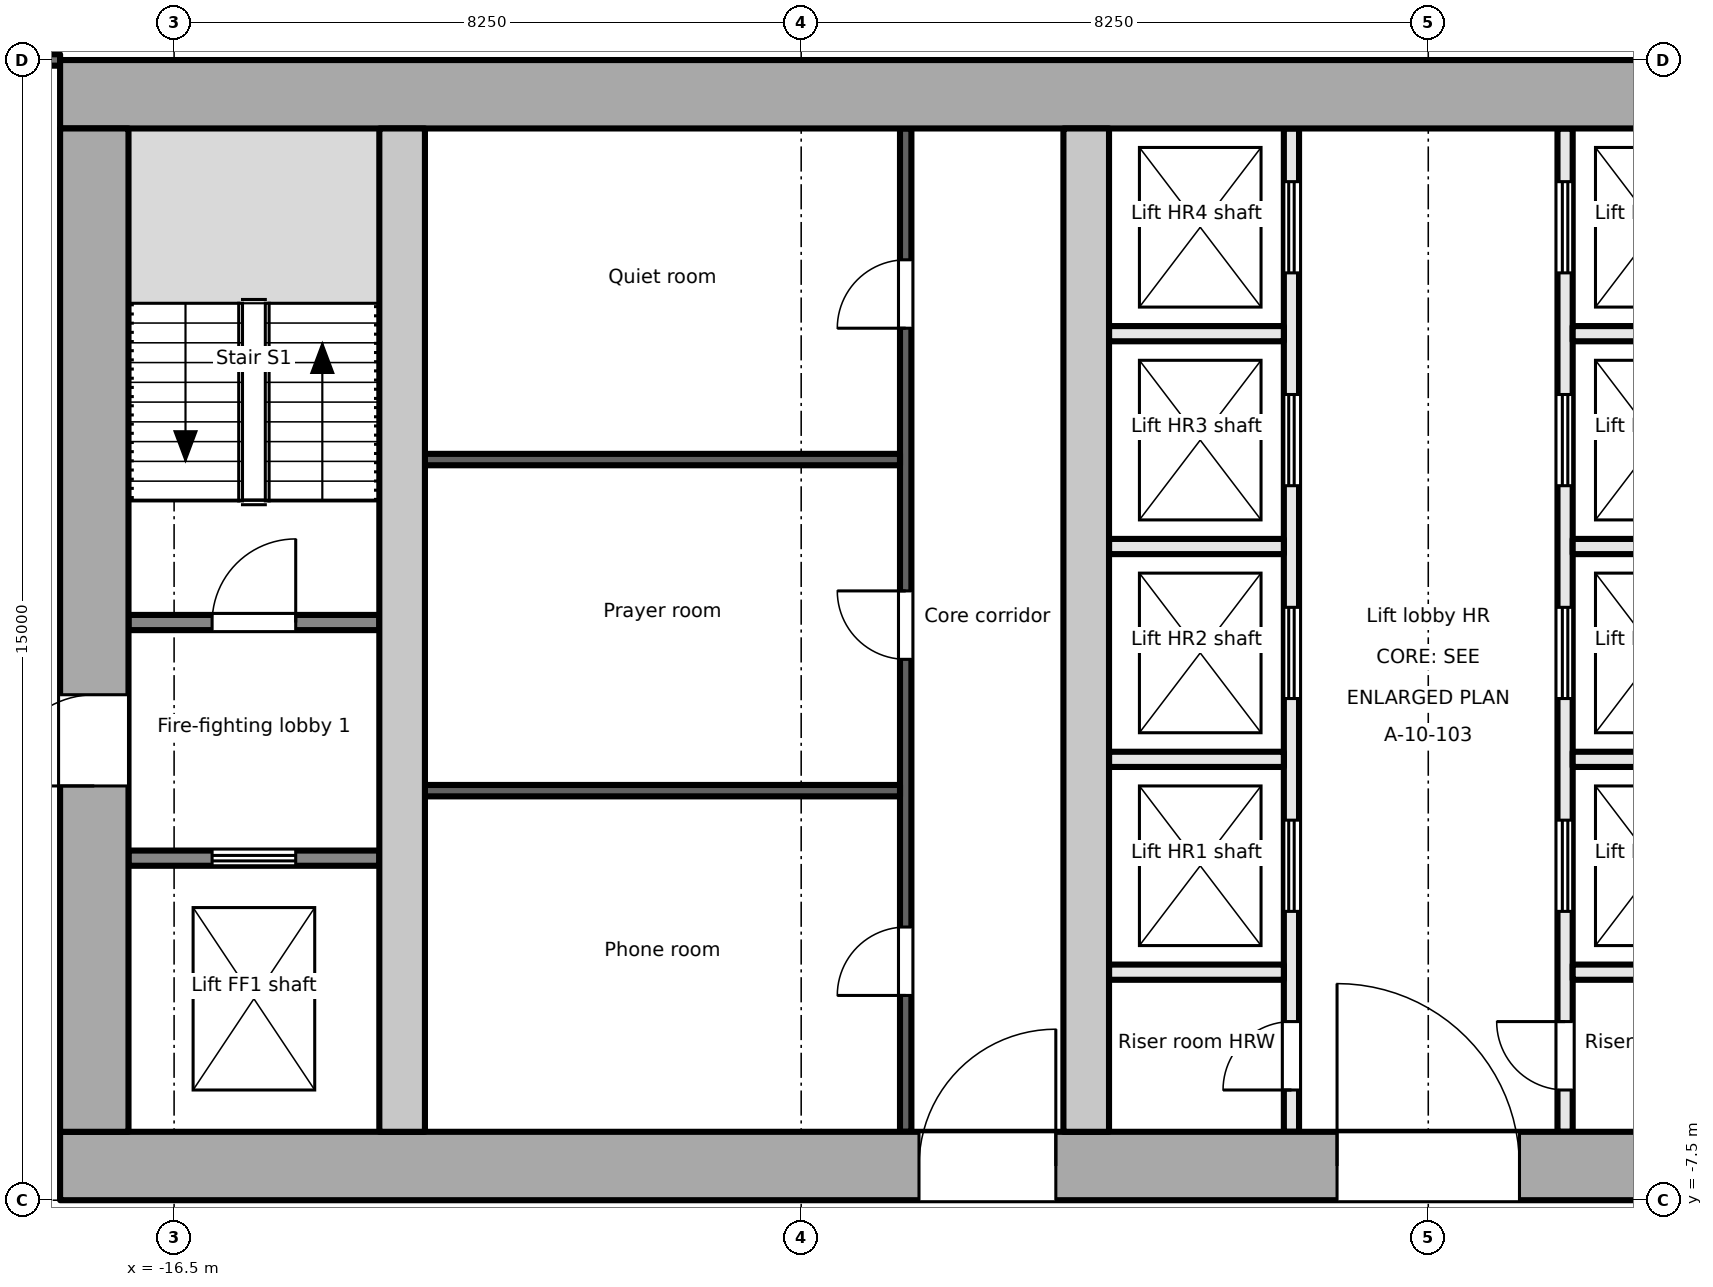
"""IFC4 building model, lengths in metres.
Left out: names, types, materials, properties, quantities, classifications, styles, units other than length and angle.
Written with IfcOpenShell. Run it as: python <this file> out.ifc"""

import sys

from ifc_helpers import new_model, si_unit, direction, frame, frame_2d, origin, place, context, subcontext, project, spatial, rectangle, extrude, element, fill, save


model = new_model("IFC4")
c1 = context("Model", 3, precision=1e-05, world=origin(), true_north=direction((0.0, 1.0)))
c2 = subcontext(c1, "Body", "Model", "MODEL_VIEW")
j1 = project(units=[si_unit("LENGTHUNIT", "METRE"), si_unit("PLANEANGLEUNIT", "RADIAN")], contexts=[c1])
p1 = place(None, origin())
s1 = spatial("IfcSite", under=j1, at=p1, CompositionType="ELEMENT")
p2 = place(p1, origin())
s2 = spatial("IfcBuilding", under=s1, at=p2, CompositionType="ELEMENT")
p3 = place(p2, frame((0.0, 0.0, 180.2)))
s3 = spatial("IfcBuildingStorey", under=s2, at=p3, CompositionType="ELEMENT", Elevation=180.2)
p4 = place(p3, frame((-18.0, -7.05, -0.2), z_axis=(0.0, 0.0, 1.0), x_axis=(1.0, 0.0, 0.0)))
e1 = element("IfcWall", 1, at=p4, inside=s3, PredefinedType="SHEAR", context=c2, shape_type="SweptSolid", body=[
    extrude(rectangle(XDim=36.0, YDim=0.9, at=frame_2d((18.0, 0.0))), origin(), (0.0, 0.0, 1.0), 3.9),
])
p5 = place(p4, frame((11.3, 0.0, 0.2)))
e2 = element("IfcOpeningElement", 2, at=p5, cuts=e1, PredefinedType="OPENING", context=c2, shape_type="SweptSolid", body=[
    extrude(rectangle(XDim=1.8, YDim=2.1, at=frame_2d((0.9, 1.05))), frame((0.0, 0.46, 0.0), z_axis=(0.0, -1.0, 0.0), x_axis=(1.0, 0.0, 0.0)), (0.0, 0.0, 1.0), 0.921),
])
p6 = place(p4, frame((16.8, 0.0, 0.2)))
e3 = element("IfcOpeningElement", 3, at=p6, cuts=e1, PredefinedType="OPENING", context=c2, shape_type="SweptSolid", body=[
    extrude(rectangle(XDim=2.4, YDim=2.1, at=frame_2d((1.2, 1.05))), frame((0.0, 0.46, 0.0), z_axis=(0.0, -1.0, 0.0), x_axis=(1.0, 0.0, 0.0)), (0.0, 0.0, 1.0), 0.921),
])
p7 = place(p4, frame((26.1, 0.0, 0.2)))
e4 = element("IfcOpeningElement", 4, at=p7, cuts=e1, PredefinedType="OPENING", context=c2, shape_type="SweptSolid", body=[
    extrude(rectangle(XDim=2.4, YDim=2.1, at=frame_2d((1.2, 1.05))), frame((0.0, 0.46, 0.0), z_axis=(0.0, -1.0, 0.0), x_axis=(1.0, 0.0, 0.0)), (0.0, 0.0, 1.0), 0.921),
])
p8 = place(p3, frame((-18.0, 7.05, -0.2), z_axis=(0.0, 0.0, 1.0), x_axis=(1.0, 0.0, 0.0)))
e5 = element("IfcWall", 5, at=p8, inside=s3, PredefinedType="SHEAR", context=c2, shape_type="SweptSolid", body=[
    extrude(rectangle(XDim=36.0, YDim=0.9, at=frame_2d((18.0, 0.0))), origin(), (0.0, 0.0, 1.0), 3.9),
])
p9 = place(p3, frame((-17.55, -6.6, -0.2), z_axis=(0.0, 0.0, 1.0), x_axis=(0.0, 1.0, 0.0)))
e6 = element("IfcWall", 6, at=p9, inside=s3, PredefinedType="SHEAR", context=c2, shape_type="SweptSolid", body=[
    extrude(rectangle(XDim=13.2, YDim=0.9, at=frame_2d((6.6, 0.0))), origin(), (0.0, 0.0, 1.0), 3.9),
])
p10 = place(p9, frame((4.55, 0.0, 0.2)))
e7 = element("IfcOpeningElement", 7, at=p10, cuts=e6, PredefinedType="OPENING", context=c2, shape_type="SweptSolid", body=[
    extrude(rectangle(XDim=1.2, YDim=2.1, at=frame_2d((0.6, 1.05))), frame((0.0, 0.46, 0.0), z_axis=(0.0, -1.0, 0.0), x_axis=(1.0, 0.0, 0.0)), (0.0, 0.0, 1.0), 0.921),
])
for number, where, z_axis, x_axis in (
    (8, (-13.5, -6.6, -0.2), (0.0, 0.0, 1.0), (0.0, 1.0, 0.0)),
    (9, (-4.5, -6.6, -0.2), (0.0, 0.0, 1.0), (0.0, 1.0, 0.0)),
):
    element("IfcWall", number, at=place(p3, frame(where, z_axis=z_axis, x_axis=x_axis)), inside=s3, PredefinedType="SHEAR", context=c2, shape_type="SweptSolid", body=[
        extrude(rectangle(XDim=13.2, YDim=0.6, at=frame_2d((6.6, 0.0))), origin(), (0.0, 0.0, 1.0), 3.9),
    ])
p11 = place(p3, frame((-17.1, -3.0, 0.0), z_axis=(0.0, 0.0, 1.0), x_axis=(1.0, 0.0, 0.0)))
e10 = element("IfcWall", 10, at=p11, inside=s3, PredefinedType="PARTITIONING", context=c2, shape_type="SweptSolid", body=[
    extrude(rectangle(XDim=3.3, YDim=0.2, at=frame_2d((1.65, 0.0))), origin(), (0.0, 0.0, 1.0), 3.7),
])
p12 = place(p11, frame((1.1, 0.0, 0.0)))
e11 = element("IfcOpeningElement", 11, at=p12, cuts=e10, PredefinedType="OPENING", context=c2, shape_type="SweptSolid", body=[
    extrude(rectangle(XDim=1.1, YDim=2.1, at=frame_2d((0.55, 1.05))), frame((0.0, 0.111, 0.0), z_axis=(0.0, -1.0, 0.0), x_axis=(1.0, 0.0, 0.0)), (0.0, 0.0, 1.0), 0.221),
])
p13 = place(p3, frame((-17.1, 0.1, 0.0), z_axis=(0.0, 0.0, 1.0), x_axis=(1.0, 0.0, 0.0)))
e12 = element("IfcWall", 12, at=p13, inside=s3, PredefinedType="PARTITIONING", context=c2, shape_type="SweptSolid", body=[
    extrude(rectangle(XDim=3.3, YDim=0.2, at=frame_2d((1.65, 0.0))), origin(), (0.0, 0.0, 1.0), 3.7),
])
p14 = place(p13, frame((1.1, 0.0, 0.0)))
e13 = element("IfcOpeningElement", 13, at=p14, cuts=e12, PredefinedType="OPENING", context=c2, shape_type="SweptSolid", body=[
    extrude(rectangle(XDim=1.1, YDim=2.1, at=frame_2d((0.55, 1.05))), frame((0.0, 0.111, 0.0), z_axis=(0.0, -1.0, 0.0), x_axis=(1.0, 0.0, 0.0)), (0.0, 0.0, 1.0), 0.221),
])
p15 = place(p3, frame((-6.875, -6.6, 0.0), z_axis=(0.0, 0.0, 1.0), x_axis=(0.0, 1.0, 0.0)))
e14 = element("IfcWall", 14, at=p15, inside=s3, PredefinedType="PARTITIONING", context=c2, shape_type="SweptSolid", body=[
    extrude(rectangle(XDim=13.2, YDim=0.15, at=frame_2d((6.6, 0.0))), origin(), (0.0, 0.0, 1.0), 3.7),
])
p16 = place(p15, frame((1.794, 0.0, 0.0)))
e15 = element("IfcOpeningElement", 15, at=p16, cuts=e14, PredefinedType="OPENING", context=c2, shape_type="SweptSolid", body=[
    extrude(rectangle(XDim=0.9, YDim=2.1, at=frame_2d((0.45, 1.05))), frame((0.0, 0.085, 0.0), z_axis=(0.0, -1.0, 0.0), x_axis=(1.0, 0.0, 0.0)), (0.0, 0.0, 1.0), 0.171),
])
p17 = place(p15, frame((6.216, 0.0, 0.0)))
e16 = element("IfcOpeningElement", 16, at=p17, cuts=e14, PredefinedType="OPENING", context=c2, shape_type="SweptSolid", body=[
    extrude(rectangle(XDim=0.9, YDim=2.1, at=frame_2d((0.45, 1.05))), frame((0.0, 0.085, 0.0), z_axis=(0.0, -1.0, 0.0), x_axis=(1.0, 0.0, 0.0)), (0.0, 0.0, 1.0), 0.171),
])
p18 = place(p15, frame((10.572, 0.0, 0.0)))
e17 = element("IfcOpeningElement", 17, at=p18, cuts=e14, PredefinedType="OPENING", context=c2, shape_type="SweptSolid", body=[
    extrude(rectangle(XDim=0.9, YDim=2.1, at=frame_2d((0.45, 1.05))), frame((0.0, 0.085, 0.0), z_axis=(0.0, -1.0, 0.0), x_axis=(1.0, 0.0, 0.0)), (0.0, 0.0, 1.0), 0.171),
])
for number, where, z_axis, x_axis in (
    (18, (-13.2, -2.112, 0.0), (0.0, 0.0, 1.0), (1.0, 0.0, 0.0)),
    (19, (-13.2, 2.244, 0.0), (0.0, 0.0, 1.0), (1.0, 0.0, 0.0)),
):
    element("IfcWall", number, at=place(p3, frame(where, z_axis=z_axis, x_axis=x_axis)), inside=s3, PredefinedType="PARTITIONING", context=c2, shape_type="SweptSolid", body=[
        extrude(rectangle(XDim=6.25, YDim=0.15, at=frame_2d((3.125, 0.0))), origin(), (0.0, 0.0, 1.0), 3.7),
    ])
p19 = place(p3, frame((-1.8, -6.6, 0.0), z_axis=(0.0, 0.0, 1.0), x_axis=(0.0, 1.0, 0.0)))
e20 = element("IfcWall", 20, at=p19, inside=s3, PredefinedType="PARTITIONING", context=c2, shape_type="SweptSolid", body=[
    extrude(rectangle(XDim=13.2, YDim=0.2, at=frame_2d((6.6, 0.0))), origin(), (0.0, 0.0, 1.0), 3.7),
])
p20 = place(p19, frame((0.55, 0.0, 0.0)))
e21 = element("IfcOpeningElement", 21, at=p20, cuts=e20, PredefinedType="OPENING", context=c2, shape_type="SweptSolid", body=[
    extrude(rectangle(XDim=0.9, YDim=2.1, at=frame_2d((0.45, 1.05))), frame((0.0, 0.111, 0.0), z_axis=(0.0, -1.0, 0.0), x_axis=(1.0, 0.0, 0.0)), (0.0, 0.0, 1.0), 0.221),
])
p21 = place(p19, frame((2.9, 0.0, 0.0)))
e22 = element("IfcOpeningElement", 22, at=p21, cuts=e20, PredefinedType="OPENING", context=c2, shape_type="SweptSolid", body=[
    extrude(rectangle(XDim=1.2, YDim=2.1, at=frame_2d((0.6, 1.05))), frame((0.0, 0.111, 0.0), z_axis=(0.0, -1.0, 0.0), x_axis=(1.0, 0.0, 0.0)), (0.0, 0.0, 1.0), 0.221),
])
p22 = place(p19, frame((5.7, 0.0, 0.0)))
e23 = element("IfcOpeningElement", 23, at=p22, cuts=e20, PredefinedType="OPENING", context=c2, shape_type="SweptSolid", body=[
    extrude(rectangle(XDim=1.2, YDim=2.1, at=frame_2d((0.6, 1.05))), frame((0.0, 0.111, 0.0), z_axis=(0.0, -1.0, 0.0), x_axis=(1.0, 0.0, 0.0)), (0.0, 0.0, 1.0), 0.221),
])
p23 = place(p19, frame((8.5, 0.0, 0.0)))
e24 = element("IfcOpeningElement", 24, at=p23, cuts=e20, PredefinedType="OPENING", context=c2, shape_type="SweptSolid", body=[
    extrude(rectangle(XDim=1.2, YDim=2.1, at=frame_2d((0.6, 1.05))), frame((0.0, 0.111, 0.0), z_axis=(0.0, -1.0, 0.0), x_axis=(1.0, 0.0, 0.0)), (0.0, 0.0, 1.0), 0.221),
])
p24 = place(p19, frame((11.3, 0.0, 0.0)))
e25 = element("IfcOpeningElement", 25, at=p24, cuts=e20, PredefinedType="OPENING", context=c2, shape_type="SweptSolid", body=[
    extrude(rectangle(XDim=1.2, YDim=2.1, at=frame_2d((0.6, 1.05))), frame((0.0, 0.111, 0.0), z_axis=(0.0, -1.0, 0.0), x_axis=(1.0, 0.0, 0.0)), (0.0, 0.0, 1.0), 0.221),
])
p25 = place(p3, frame((1.8, -6.6, 0.0), z_axis=(0.0, 0.0, 1.0), x_axis=(0.0, 1.0, 0.0)))
e26 = element("IfcWall", 26, at=p25, inside=s3, PredefinedType="PARTITIONING", context=c2, shape_type="SweptSolid", body=[
    extrude(rectangle(XDim=13.2, YDim=0.2, at=frame_2d((6.6, 0.0))), origin(), (0.0, 0.0, 1.0), 3.7),
])
p26 = place(p25, frame((0.55, 0.0, 0.0)))
e27 = element("IfcOpeningElement", 27, at=p26, cuts=e26, PredefinedType="OPENING", context=c2, shape_type="SweptSolid", body=[
    extrude(rectangle(XDim=0.9, YDim=2.1, at=frame_2d((0.45, 1.05))), frame((0.0, 0.111, 0.0), z_axis=(0.0, -1.0, 0.0), x_axis=(1.0, 0.0, 0.0)), (0.0, 0.0, 1.0), 0.221),
])
p27 = place(p25, frame((2.9, 0.0, 0.0)))
e28 = element("IfcOpeningElement", 28, at=p27, cuts=e26, PredefinedType="OPENING", context=c2, shape_type="SweptSolid", body=[
    extrude(rectangle(XDim=1.2, YDim=2.1, at=frame_2d((0.6, 1.05))), frame((0.0, 0.111, 0.0), z_axis=(0.0, -1.0, 0.0), x_axis=(1.0, 0.0, 0.0)), (0.0, 0.0, 1.0), 0.221),
])
p28 = place(p25, frame((5.7, 0.0, 0.0)))
e29 = element("IfcOpeningElement", 29, at=p28, cuts=e26, PredefinedType="OPENING", context=c2, shape_type="SweptSolid", body=[
    extrude(rectangle(XDim=1.2, YDim=2.1, at=frame_2d((0.6, 1.05))), frame((0.0, 0.111, 0.0), z_axis=(0.0, -1.0, 0.0), x_axis=(1.0, 0.0, 0.0)), (0.0, 0.0, 1.0), 0.221),
])
p29 = place(p25, frame((8.5, 0.0, 0.0)))
e30 = element("IfcOpeningElement", 30, at=p29, cuts=e26, PredefinedType="OPENING", context=c2, shape_type="SweptSolid", body=[
    extrude(rectangle(XDim=1.2, YDim=2.1, at=frame_2d((0.6, 1.05))), frame((0.0, 0.111, 0.0), z_axis=(0.0, -1.0, 0.0), x_axis=(1.0, 0.0, 0.0)), (0.0, 0.0, 1.0), 0.221),
])
p30 = place(p25, frame((11.3, 0.0, 0.0)))
e31 = element("IfcOpeningElement", 31, at=p30, cuts=e26, PredefinedType="OPENING", context=c2, shape_type="SweptSolid", body=[
    extrude(rectangle(XDim=1.2, YDim=2.1, at=frame_2d((0.6, 1.05))), frame((0.0, 0.111, 0.0), z_axis=(0.0, -1.0, 0.0), x_axis=(1.0, 0.0, 0.0)), (0.0, 0.0, 1.0), 0.221),
])
for number, where, z_axis, x_axis in (
    (32, (-4.2, -1.7, 0.0), (0.0, 0.0, 1.0), (1.0, 0.0, 0.0)),
    (33, (-4.2, 1.1, 0.0), (0.0, 0.0, 1.0), (1.0, 0.0, 0.0)),
    (34, (-4.2, 3.9, 0.0), (0.0, 0.0, 1.0), (1.0, 0.0, 0.0)),
    (35, (-4.2, -4.5, 0.0), (0.0, 0.0, 1.0), (1.0, 0.0, 0.0)),
    (36, (1.9, -1.7, 0.0), (0.0, 0.0, 1.0), (1.0, 0.0, 0.0)),
    (37, (1.9, 1.1, 0.0), (0.0, 0.0, 1.0), (1.0, 0.0, 0.0)),
    (38, (1.9, 3.9, 0.0), (0.0, 0.0, 1.0), (1.0, 0.0, 0.0)),
    (39, (1.9, -4.5, 0.0), (0.0, 0.0, 1.0), (1.0, 0.0, 0.0)),
):
    element("IfcWall", number, at=place(p3, frame(where, z_axis=z_axis, x_axis=x_axis)), inside=s3, PredefinedType="PARTITIONING", context=c2, shape_type="SweptSolid", body=[
        extrude(rectangle(XDim=2.3, YDim=0.2, at=frame_2d((1.15, 0.0))), origin(), (0.0, 0.0, 1.0), 3.7),
    ])
p31 = place(p3, frame((-20.625, 7.501, 0.0), z_axis=(0.0, 0.0, 1.0), x_axis=(1.0, 0.0, 0.0)))
e40 = element("IfcWall", 40, at=p31, inside=s3, PredefinedType="PARTITIONING", context=c2, shape_type="SweptSolid", body=[
    extrude(rectangle(XDim=2.625, YDim=0.15, at=frame_2d((1.312, 0.0))), origin(), (0.0, 0.0, 1.0), 3.7),
])
p32 = place(p12, origin())
e41 = element("IfcDoor", 41, at=p32, inside=s3, OperationType="DOUBLE_DOOR_SLIDING", PredefinedType="DOOR", context=c2, shape_type="SweptSolid", body=[
    extrude(rectangle(XDim=1.1, YDim=2.1, at=frame_2d((0.55, 1.05))), frame((0.0, 0.025, 0.0), z_axis=(0.0, -1.0, 0.0), x_axis=(1.0, 0.0, 0.0)), (0.0, 0.0, 1.0), 0.05),
])
fill(e11, e41)
p33 = place(p10, origin())
e42 = element("IfcDoor", 42, at=p33, inside=s3, OperationType="SINGLE_SWING_LEFT", PredefinedType="DOOR", context=c2, shape_type="SweptSolid", body=[
    extrude(rectangle(XDim=1.2, YDim=2.1, at=frame_2d((0.6, 1.05))), frame((0.0, 0.025, 0.0), z_axis=(0.0, -1.0, 0.0), x_axis=(1.0, 0.0, 0.0)), (0.0, 0.0, 1.0), 0.05),
])
fill(e7, e42)
p34 = place(p14, origin())
e43 = element("IfcDoor", 43, at=p34, inside=s3, OperationType="SINGLE_SWING_RIGHT", PredefinedType="DOOR", context=c2, shape_type="SweptSolid", body=[
    extrude(rectangle(XDim=1.1, YDim=2.1, at=frame_2d((0.55, 1.05))), frame((0.0, 0.025, 0.0), z_axis=(0.0, -1.0, 0.0), x_axis=(1.0, 0.0, 0.0)), (0.0, 0.0, 1.0), 0.05),
])
fill(e13, e43)
p35 = place(p16, origin())
e44 = element("IfcDoor", 44, at=p35, inside=s3, OperationType="SINGLE_SWING_LEFT", PredefinedType="DOOR", context=c2, shape_type="SweptSolid", body=[
    extrude(rectangle(XDim=0.9, YDim=2.1, at=frame_2d((0.45, 1.05))), frame((0.0, 0.025, 0.0), z_axis=(0.0, -1.0, 0.0), x_axis=(1.0, 0.0, 0.0)), (0.0, 0.0, 1.0), 0.05),
])
fill(e15, e44)
p36 = place(p17, origin())
e45 = element("IfcDoor", 45, at=p36, inside=s3, OperationType="SINGLE_SWING_RIGHT", PredefinedType="DOOR", context=c2, shape_type="SweptSolid", body=[
    extrude(rectangle(XDim=0.9, YDim=2.1, at=frame_2d((0.45, 1.05))), frame((0.0, 0.025, 0.0), z_axis=(0.0, -1.0, 0.0), x_axis=(1.0, 0.0, 0.0)), (0.0, 0.0, 1.0), 0.05),
])
fill(e16, e45)
p37 = place(p18, origin())
e46 = element("IfcDoor", 46, at=p37, inside=s3, OperationType="SINGLE_SWING_LEFT", PredefinedType="DOOR", context=c2, shape_type="SweptSolid", body=[
    extrude(rectangle(XDim=0.9, YDim=2.1, at=frame_2d((0.45, 1.05))), frame((0.0, 0.025, 0.0), z_axis=(0.0, -1.0, 0.0), x_axis=(1.0, 0.0, 0.0)), (0.0, 0.0, 1.0), 0.05),
])
fill(e17, e46)
p38 = place(p5, origin())
e47 = element("IfcDoor", 47, at=p38, inside=s3, OperationType="SINGLE_SWING_RIGHT", PredefinedType="DOOR", context=c2, shape_type="SweptSolid", body=[
    extrude(rectangle(XDim=1.8, YDim=2.1, at=frame_2d((0.9, 1.05))), frame((0.0, 0.025, 0.0), z_axis=(0.0, -1.0, 0.0), x_axis=(1.0, 0.0, 0.0)), (0.0, 0.0, 1.0), 0.05),
])
fill(e2, e47)
p39 = place(p20, origin())
e48 = element("IfcDoor", 48, at=p39, inside=s3, OperationType="SINGLE_SWING_LEFT", PredefinedType="DOOR", context=c2, shape_type="SweptSolid", body=[
    extrude(rectangle(XDim=0.9, YDim=2.1, at=frame_2d((0.45, 1.05))), frame((0.0, 0.025, 0.0), z_axis=(0.0, -1.0, 0.0), x_axis=(1.0, 0.0, 0.0)), (0.0, 0.0, 1.0), 0.05),
])
fill(e21, e48)
p40 = place(p21, origin())
e49 = element("IfcDoor", 49, at=p40, inside=s3, OperationType="DOUBLE_DOOR_SLIDING", PredefinedType="DOOR", context=c2, shape_type="SweptSolid", body=[
    extrude(rectangle(XDim=1.2, YDim=2.1, at=frame_2d((0.6, 1.05))), frame((0.0, 0.025, 0.0), z_axis=(0.0, -1.0, 0.0), x_axis=(1.0, 0.0, 0.0)), (0.0, 0.0, 1.0), 0.05),
])
fill(e22, e49)
p41 = place(p22, origin())
e50 = element("IfcDoor", 50, at=p41, inside=s3, OperationType="DOUBLE_DOOR_SLIDING", PredefinedType="DOOR", context=c2, shape_type="SweptSolid", body=[
    extrude(rectangle(XDim=1.2, YDim=2.1, at=frame_2d((0.6, 1.05))), frame((0.0, 0.025, 0.0), z_axis=(0.0, -1.0, 0.0), x_axis=(1.0, 0.0, 0.0)), (0.0, 0.0, 1.0), 0.05),
])
fill(e23, e50)
p42 = place(p23, origin())
e51 = element("IfcDoor", 51, at=p42, inside=s3, OperationType="DOUBLE_DOOR_SLIDING", PredefinedType="DOOR", context=c2, shape_type="SweptSolid", body=[
    extrude(rectangle(XDim=1.2, YDim=2.1, at=frame_2d((0.6, 1.05))), frame((0.0, 0.025, 0.0), z_axis=(0.0, -1.0, 0.0), x_axis=(1.0, 0.0, 0.0)), (0.0, 0.0, 1.0), 0.05),
])
fill(e24, e51)
p43 = place(p24, origin())
e52 = element("IfcDoor", 52, at=p43, inside=s3, OperationType="DOUBLE_DOOR_SLIDING", PredefinedType="DOOR", context=c2, shape_type="SweptSolid", body=[
    extrude(rectangle(XDim=1.2, YDim=2.1, at=frame_2d((0.6, 1.05))), frame((0.0, 0.025, 0.0), z_axis=(0.0, -1.0, 0.0), x_axis=(1.0, 0.0, 0.0)), (0.0, 0.0, 1.0), 0.05),
])
fill(e25, e52)
p44 = place(p26, origin())
e53 = element("IfcDoor", 53, at=p44, inside=s3, OperationType="SINGLE_SWING_RIGHT", PredefinedType="DOOR", context=c2, shape_type="SweptSolid", body=[
    extrude(rectangle(XDim=0.9, YDim=2.1, at=frame_2d((0.45, 1.05))), frame((0.0, 0.025, 0.0), z_axis=(0.0, -1.0, 0.0), x_axis=(1.0, 0.0, 0.0)), (0.0, 0.0, 1.0), 0.05),
])
fill(e27, e53)
p45 = place(p27, origin())
e54 = element("IfcDoor", 54, at=p45, inside=s3, OperationType="DOUBLE_DOOR_SLIDING", PredefinedType="DOOR", context=c2, shape_type="SweptSolid", body=[
    extrude(rectangle(XDim=1.2, YDim=2.1, at=frame_2d((0.6, 1.05))), frame((0.0, 0.025, 0.0), z_axis=(0.0, -1.0, 0.0), x_axis=(1.0, 0.0, 0.0)), (0.0, 0.0, 1.0), 0.05),
])
fill(e28, e54)
p46 = place(p28, origin())
e55 = element("IfcDoor", 55, at=p46, inside=s3, OperationType="DOUBLE_DOOR_SLIDING", PredefinedType="DOOR", context=c2, shape_type="SweptSolid", body=[
    extrude(rectangle(XDim=1.2, YDim=2.1, at=frame_2d((0.6, 1.05))), frame((0.0, 0.025, 0.0), z_axis=(0.0, -1.0, 0.0), x_axis=(1.0, 0.0, 0.0)), (0.0, 0.0, 1.0), 0.05),
])
fill(e29, e55)
p47 = place(p29, origin())
e56 = element("IfcDoor", 56, at=p47, inside=s3, OperationType="DOUBLE_DOOR_SLIDING", PredefinedType="DOOR", context=c2, shape_type="SweptSolid", body=[
    extrude(rectangle(XDim=1.2, YDim=2.1, at=frame_2d((0.6, 1.05))), frame((0.0, 0.025, 0.0), z_axis=(0.0, -1.0, 0.0), x_axis=(1.0, 0.0, 0.0)), (0.0, 0.0, 1.0), 0.05),
])
fill(e30, e56)
p48 = place(p30, origin())
e57 = element("IfcDoor", 57, at=p48, inside=s3, OperationType="DOUBLE_DOOR_SLIDING", PredefinedType="DOOR", context=c2, shape_type="SweptSolid", body=[
    extrude(rectangle(XDim=1.2, YDim=2.1, at=frame_2d((0.6, 1.05))), frame((0.0, 0.025, 0.0), z_axis=(0.0, -1.0, 0.0), x_axis=(1.0, 0.0, 0.0)), (0.0, 0.0, 1.0), 0.05),
])
fill(e31, e57)
p49 = place(p6, origin())
e58 = element("IfcDoor", 58, at=p49, inside=s3, OperationType="DOUBLE_DOOR_DOUBLE_SWING", PredefinedType="DOOR", context=c2, shape_type="SweptSolid", body=[
    extrude(rectangle(XDim=2.4, YDim=2.1, at=frame_2d((1.2, 1.05))), frame((0.0, 0.025, 0.0), z_axis=(0.0, -1.0, 0.0), x_axis=(1.0, 0.0, 0.0)), (0.0, 0.0, 1.0), 0.05),
])
fill(e3, e58)
save(model, sys.argv[1])
